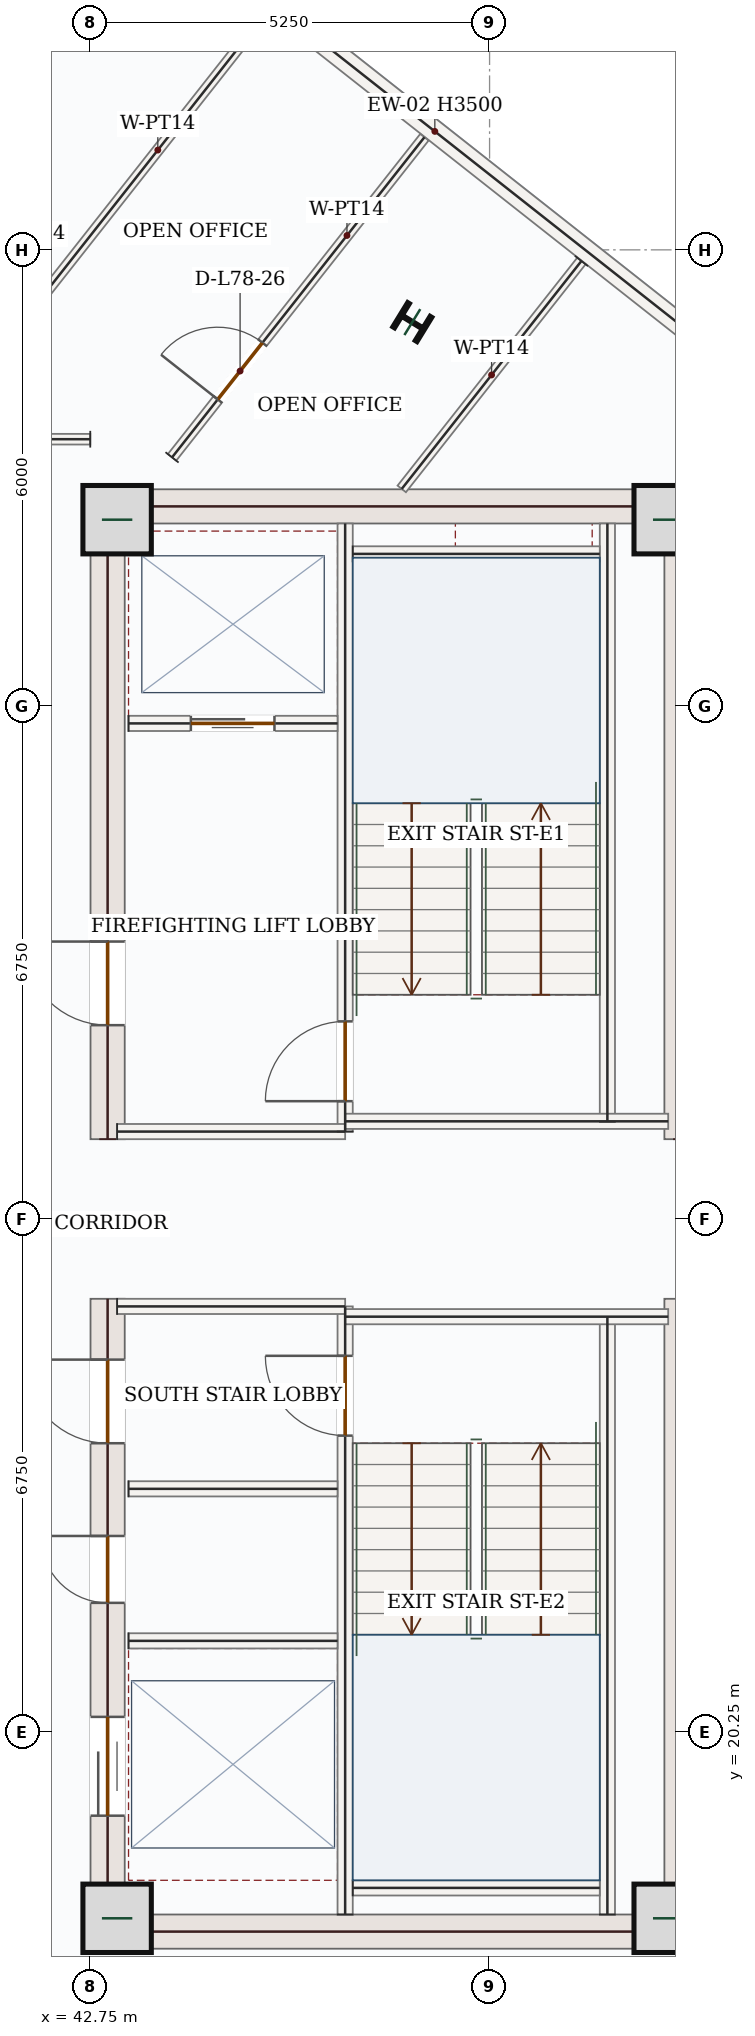
"""IFC4 building model, lengths in metres.
Left out: names, types, materials, properties, quantities, classifications, styles, units other than length and angle.
Written with IfcOpenShell. Run it as: python <this file> out.ifc"""

import sys

from ifc_helpers import new_model, si_unit, direction, frame, frame_2d, origin, origin_2d, place, context, subcontext, project, spatial, rectangle, i_section, extrude, source, transform, mapped, element, fill, save


model = new_model("IFC4")
c1 = context("Model", 3, precision=1e-05, world=origin(), true_north=direction((0.0, 1.0)))
c2 = subcontext(c1, "Body", "Model", "MODEL_VIEW")
j1 = project(units=[si_unit("LENGTHUNIT", "METRE"), si_unit("PLANEANGLEUNIT", "RADIAN")], contexts=[c1])
p1 = place(None, origin())
s1 = spatial("IfcSite", under=j1, at=p1, CompositionType="ELEMENT")
p2 = place(p1, origin())
s2 = spatial("IfcBuilding", under=s1, at=p2, CompositionType="ELEMENT")
p3 = place(p2, frame((0.0, 0.0, 323.55)))
s3 = spatial("IfcBuildingStorey", under=s2, at=p3, CompositionType="ELEMENT", Elevation=323.55)
p4 = place(p3, frame((42.975, 17.4, 0.0), z_axis=(0.0, 0.0, 1.0), x_axis=(0.0, 1.0, 0.0)))
e1 = element("IfcWall", 1, at=p4, inside=s3, PredefinedType="SHEAR", context=c2, shape_type="SweptSolid", body=[
    extrude(rectangle(XDim=8.55, YDim=0.45, at=frame_2d((4.275, 0.0))), origin(), (0.0, 0.0, 1.0), 3.5),
])
p5 = place(p4, frame((6.65, 0.0, 0.0)))
e2 = element("IfcOpeningElement", 2, at=p5, cuts=e1, PredefinedType="OPENING", context=c2, shape_type="SweptSolid", body=[
    extrude(rectangle(XDim=1.1, YDim=2.2, at=frame_2d((0.55, 1.1))), frame((0.0, 0.235, 0.0), z_axis=(0.0, -1.0, 0.0), x_axis=(1.0, 0.0, 0.0)), (0.0, 0.0, 1.0), 0.47),
])
p6 = place(p4, frame((1.75, 0.0, 0.0)))
e3 = element("IfcOpeningElement", 3, at=p6, cuts=e1, PredefinedType="OPENING", context=c2, shape_type="SweptSolid", body=[
    extrude(rectangle(XDim=1.3, YDim=2.2, at=frame_2d((0.65, 1.1))), frame((0.0, 0.235, 0.0), z_axis=(0.0, -1.0, 0.0), x_axis=(1.0, 0.0, 0.0)), (0.0, 0.0, 1.0), 0.47),
])
p7 = place(p4, frame((4.55, 0.0, 0.0)))
e4 = element("IfcOpeningElement", 4, at=p7, cuts=e1, PredefinedType="OPENING", context=c2, shape_type="SweptSolid", body=[
    extrude(rectangle(XDim=0.88, YDim=2.1, at=frame_2d((0.44, 1.05))), frame((0.0, 0.235, 0.0), z_axis=(0.0, -1.0, 0.0), x_axis=(1.0, 0.0, 0.0)), (0.0, 0.0, 1.0), 0.47),
])
p8 = place(p3, frame((42.975, 28.05, 0.0), z_axis=(0.0, 0.0, 1.0), x_axis=(0.0, 1.0, 0.0)))
e5 = element("IfcWall", 5, at=p8, inside=s3, PredefinedType="SHEAR", context=c2, shape_type="SweptSolid", body=[
    extrude(rectangle(XDim=8.55, YDim=0.45, at=frame_2d((4.275, 0.0))), origin(), (0.0, 0.0, 1.0), 3.5),
])
p9 = place(p8, frame((1.5, 0.0, 0.0)))
e6 = element("IfcOpeningElement", 6, at=p9, cuts=e5, PredefinedType="OPENING", context=c2, shape_type="SweptSolid", body=[
    extrude(rectangle(XDim=1.1, YDim=2.2, at=frame_2d((0.55, 1.1))), frame((0.0, 0.235, 0.0), z_axis=(0.0, -1.0, 0.0), x_axis=(1.0, 0.0, 0.0)), (0.0, 0.0, 1.0), 0.47),
])
m1 = source(origin(), c2, "Body", "SweptSolid", [
    extrude(rectangle(XDim=8.55, YDim=0.45, at=frame_2d((4.275, 0.0))), origin(), (0.0, 0.0, 1.0), 3.5),
])
for number, where, z_axis, x_axis in (
    (7, (50.525, 17.4, 0.0), (0.0, 0.0, 1.0), (0.0, 1.0, 0.0)),
    (8, (50.525, 28.05, 0.0), (0.0, 0.0, 1.0), (0.0, 1.0, 0.0)),
):
    element("IfcWall", number, at=place(p3, frame(where, z_axis=z_axis, x_axis=x_axis)), inside=s3, PredefinedType="SHEAR", context=c2, shape_type="MappedRepresentation", body=[
        mapped(m1, transform((0.0, 0.0, 0.0), x_axis=(1.0, 0.0, 0.0), y_axis=(0.0, 1.0, 0.0), z_axis=(0.0, 0.0, 1.0), scale=1.0)),
    ])
m2 = source(origin(), c2, "Body", "SweptSolid", [
    extrude(rectangle(XDim=7.1, YDim=0.45, at=frame_2d((3.55, 0.0))), origin(), (0.0, 0.0, 1.0), 3.5),
])
for number, where, z_axis, x_axis in (
    (9, (43.2, 17.625, 0.0), (0.0, 0.0, 1.0), (1.0, 0.0, 0.0)),
    (10, (43.2, 36.375, 0.0), (0.0, 0.0, 1.0), (1.0, 0.0, 0.0)),
):
    element("IfcWall", number, at=place(p3, frame(where, z_axis=z_axis, x_axis=x_axis)), inside=s3, PredefinedType="SHEAR", context=c2, shape_type="MappedRepresentation", body=[
        mapped(m2, transform((0.0, 0.0, 0.0), x_axis=(1.0, 0.0, 0.0), y_axis=(0.0, 1.0, 0.0), z_axis=(0.0, 0.0, 1.0), scale=1.0)),
    ])
m3 = source(origin(), c2, "Body", "SweptSolid", [
    extrude(rectangle(XDim=0.9, YDim=0.9, at=origin_2d()), origin(), (0.0, 0.0, 1.0), 3.75),
])
for number, where, z_axis, x_axis in (
    (11, (43.1, 17.8, 0.0), (0.0, 0.0, 1.0), (1.0, 0.0, 0.0)),
    (12, (50.35, 17.8, 0.0), (0.0, 0.0, 1.0), (1.0, 0.0, 0.0)),
    (13, (43.1, 36.2, 0.0), (0.0, 0.0, 1.0), (1.0, 0.0, 0.0)),
    (14, (50.35, 36.2, 0.0), (0.0, 0.0, 1.0), (1.0, 0.0, 0.0)),
):
    element("IfcColumn", number, at=place(p3, frame(where, z_axis=z_axis, x_axis=x_axis)), inside=s3, PredefinedType="COLUMN", context=c2, shape_type="MappedRepresentation", body=[
        mapped(m3, transform((0.0, 0.0, 0.0), x_axis=(1.0, 0.0, 0.0), y_axis=(0.0, 1.0, 0.0), z_axis=(0.0, 0.0, 1.0), scale=1.0)),
    ])
m4 = source(origin(), c2, "Body", "SweptSolid", [
    extrude(i_section(OverallWidth=0.374, OverallDepth=0.372, WebThickness=0.016, FlangeThickness=0.026, FilletRadius=0.018, at=origin_2d()), origin(), (0.0, 0.0, 1.0), 3.75),
])
p10 = place(p3, frame((46.984, 38.8, 0.0), z_axis=(0.0, 0.0, 1.0), x_axis=(0.522498564716, 0.852640164354, 0.0)))
e15 = element("IfcColumn", 15, at=p10, inside=s3, PredefinedType="COLUMN", context=c2, shape_type="MappedRepresentation", body=[
    mapped(m4, transform((0.0, 0.0, 0.0), x_axis=(1.0, 0.0, 0.0), y_axis=(0.0, 1.0, 0.0), z_axis=(0.0, 0.0, 1.0), scale=1.0)),
])
m5 = source(origin(), c2, "Body", "SweptSolid", [
    extrude(rectangle(XDim=9.92, YDim=0.28, at=frame_2d((4.96, 0.0))), origin(), (0.0, 0.0, 1.0), 3.5),
])
p11 = place(p3, frame((43.385, 44.379, 0.0), z_axis=(0.0, 0.0, 1.0), x_axis=(0.785317257435, -0.619093535077, 0.0)))
e16 = element("IfcWall", 16, at=p11, inside=s3, PredefinedType="SOLIDWALL", context=c2, shape_type="MappedRepresentation", body=[
    mapped(m5, transform((0.0, 0.0, 0.0), x_axis=(1.0, 0.0, 0.0), y_axis=(0.0, 1.0, 0.0), z_axis=(0.0, 0.0, 1.0), scale=1.0)),
])
p12 = place(p3, frame((53.06, 18.458, 0.0), z_axis=(0.0, 0.0, 1.0), x_axis=(-0.707106781187, -0.707106781187, 0.0)))
e17 = element("IfcWall", 17, at=p12, inside=s3, PredefinedType="SOLIDWALL", context=c2, shape_type="SweptSolid", body=[
    extrude(rectangle(XDim=3.963, YDim=0.28, at=frame_2d((1.982, 0.0))), origin(), (0.0, 0.0, 1.0), 3.5),
])
p13 = place(p12, frame((1.232, 0.0, 0.85)))
e18 = element("IfcOpeningElement", 18, at=p13, cuts=e17, PredefinedType="OPENING", context=c2, shape_type="SweptSolid", body=[
    extrude(rectangle(XDim=1.5, YDim=1.5, at=frame_2d((0.75, 0.75))), frame((0.0, 0.15, 0.0), z_axis=(0.0, -1.0, 0.0), x_axis=(1.0, 0.0, 0.0)), (0.0, 0.0, 1.0), 0.3),
])
m6 = source(origin(), c2, "Body", "SweptSolid", [
    extrude(rectangle(XDim=7.87, YDim=0.2, at=frame_2d((3.935, 0.0))), origin(), (0.0, 0.0, 1.0), 3.5),
])
for number, where, z_axis, x_axis in (
    (19, (49.55, 17.85, 0.0), (0.0, 0.0, 1.0), (0.0, 1.0, 0.0)),
    (20, (49.55, 28.28, 0.0), (0.0, 0.0, 1.0), (0.0, 1.0, 0.0)),
):
    element("IfcWall", number, at=place(p3, frame(where, z_axis=z_axis, x_axis=x_axis)), inside=s3, PredefinedType="SOLIDWALL", context=c2, shape_type="MappedRepresentation", body=[
        mapped(m6, transform((0.0, 0.0, 0.0), x_axis=(1.0, 0.0, 0.0), y_axis=(0.0, 1.0, 0.0), z_axis=(0.0, 0.0, 1.0), scale=1.0)),
    ])
p14 = place(p3, frame((46.1, 17.85, 0.0), z_axis=(0.0, 0.0, 1.0), x_axis=(0.0, 1.0, 0.0)))
e21 = element("IfcWall", 21, at=p14, inside=s3, PredefinedType="SOLIDWALL", context=c2, shape_type="SweptSolid", body=[
    extrude(rectangle(XDim=8.0, YDim=0.2, at=frame_2d((4.0, 0.0))), origin(), (0.0, 0.0, 1.0), 3.5),
])
p15 = place(p14, frame((6.3, 0.0, 0.0)))
e22 = element("IfcOpeningElement", 22, at=p15, cuts=e21, PredefinedType="OPENING", context=c2, shape_type="SweptSolid", body=[
    extrude(rectangle(XDim=1.05, YDim=2.15, at=frame_2d((0.525, 1.075))), frame((0.0, 0.11, 0.0), z_axis=(0.0, -1.0, 0.0), x_axis=(1.0, 0.0, 0.0)), (0.0, 0.0, 1.0), 0.22),
])
p16 = place(p3, frame((46.1, 28.15, 0.0), z_axis=(0.0, 0.0, 1.0), x_axis=(0.0, 1.0, 0.0)))
e23 = element("IfcWall", 23, at=p16, inside=s3, PredefinedType="SOLIDWALL", context=c2, shape_type="SweptSolid", body=[
    extrude(rectangle(XDim=8.0, YDim=0.2, at=frame_2d((4.0, 0.0))), origin(), (0.0, 0.0, 1.0), 3.5),
])
p17 = place(p16, frame((0.4, 0.0, 0.0)))
e24 = element("IfcOpeningElement", 24, at=p17, cuts=e23, PredefinedType="OPENING", context=c2, shape_type="SweptSolid", body=[
    extrude(rectangle(XDim=1.05, YDim=2.15, at=frame_2d((0.525, 1.075))), frame((0.0, 0.11, 0.0), z_axis=(0.0, -1.0, 0.0), x_axis=(1.0, 0.0, 0.0)), (0.0, 0.0, 1.0), 0.22),
])
m7 = source(origin(), c2, "Body", "SweptSolid", [
    extrude(rectangle(XDim=3.0, YDim=0.2, at=frame_2d((1.5, 0.0))), origin(), (0.0, 0.0, 1.0), 3.5),
])
p18 = place(p3, frame((43.1, 25.85, 0.0), z_axis=(0.0, 0.0, 1.0), x_axis=(1.0, 0.0, 0.0)))
e25 = element("IfcWall", 25, at=p18, inside=s3, PredefinedType="SOLIDWALL", context=c2, shape_type="MappedRepresentation", body=[
    mapped(m7, transform((0.0, 0.0, 0.0), x_axis=(1.0, 0.0, 0.0), y_axis=(0.0, 1.0, 0.0), z_axis=(0.0, 0.0, 1.0), scale=1.0)),
])
m8 = source(origin(), c2, "Body", "SweptSolid", [
    extrude(rectangle(XDim=4.25, YDim=0.2, at=frame_2d((2.125, 0.0))), origin(), (0.0, 0.0, 1.0), 3.5),
])
p19 = place(p3, frame((46.1, 25.715, 0.0), z_axis=(0.0, 0.0, 1.0), x_axis=(1.0, 0.0, 0.0)))
e26 = element("IfcWall", 26, at=p19, inside=s3, PredefinedType="SOLIDWALL", context=c2, shape_type="MappedRepresentation", body=[
    mapped(m8, transform((0.0, 0.0, 0.0), x_axis=(1.0, 0.0, 0.0), y_axis=(0.0, 1.0, 0.0), z_axis=(0.0, 0.0, 1.0), scale=1.0)),
])
p20 = place(p3, frame((43.1, 28.15, 0.0), z_axis=(0.0, 0.0, 1.0), x_axis=(1.0, 0.0, 0.0)))
e27 = element("IfcWall", 27, at=p20, inside=s3, PredefinedType="SOLIDWALL", context=c2, shape_type="MappedRepresentation", body=[
    mapped(m7, transform((0.0, 0.0, 0.0), x_axis=(1.0, 0.0, 0.0), y_axis=(0.0, 1.0, 0.0), z_axis=(0.0, 0.0, 1.0), scale=1.0)),
])
p21 = place(p3, frame((46.1, 28.285, 0.0), z_axis=(0.0, 0.0, 1.0), x_axis=(1.0, 0.0, 0.0)))
e28 = element("IfcWall", 28, at=p21, inside=s3, PredefinedType="SOLIDWALL", context=c2, shape_type="MappedRepresentation", body=[
    mapped(m8, transform((0.0, 0.0, 0.0), x_axis=(1.0, 0.0, 0.0), y_axis=(0.0, 1.0, 0.0), z_axis=(0.0, 0.0, 1.0), scale=1.0)),
])
m9 = source(origin(), c2, "Body", "SweptSolid", [
    extrude(rectangle(XDim=3.25, YDim=0.2, at=frame_2d((1.625, 0.0))), origin(), (0.0, 0.0, 1.0), 3.5),
])
for number, where, z_axis, x_axis in (
    (29, (46.2, 35.75, 0.0), (0.0, 0.0, 1.0), (1.0, 0.0, 0.0)),
    (30, (46.2, 18.2, 0.0), (0.0, 0.0, 1.0), (1.0, 0.0, 0.0)),
):
    element("IfcWall", number, at=place(p3, frame(where, z_axis=z_axis, x_axis=x_axis)), inside=s3, PredefinedType="SOLIDWALL", context=c2, shape_type="MappedRepresentation", body=[
        mapped(m9, transform((0.0, 0.0, 0.0), x_axis=(1.0, 0.0, 0.0), y_axis=(0.0, 1.0, 0.0), z_axis=(0.0, 0.0, 1.0), scale=1.0)),
    ])
p22 = place(p3, frame((43.25, 33.52, 0.0), z_axis=(0.0, 0.0, 1.0), x_axis=(1.0, 0.0, 0.0)))
e31 = element("IfcWall", 31, at=p22, inside=s3, PredefinedType="SOLIDWALL", context=c2, shape_type="SweptSolid", body=[
    extrude(rectangle(XDim=2.75, YDim=0.2, at=frame_2d((1.375, 0.0))), origin(), (0.0, 0.0, 1.0), 3.5),
])
p23 = place(p22, frame((0.82, 0.0, 0.0)))
e32 = element("IfcOpeningElement", 32, at=p23, cuts=e31, PredefinedType="OPENING", context=c2, shape_type="SweptSolid", body=[
    extrude(rectangle(XDim=1.1, YDim=2.15, at=frame_2d((0.55, 1.075))), frame((0.0, 0.11, 0.0), z_axis=(0.0, -1.0, 0.0), x_axis=(1.0, 0.0, 0.0)), (0.0, 0.0, 1.0), 0.22),
])
m10 = source(origin(), c2, "Body", "SweptSolid", [
    extrude(rectangle(XDim=2.75, YDim=0.2, at=frame_2d((1.375, 0.0))), origin(), (0.0, 0.0, 1.0), 3.5),
])
for number, where, z_axis, x_axis in (
    (33, (43.25, 23.45, 0.0), (0.0, 0.0, 1.0), (1.0, 0.0, 0.0)),
    (34, (43.25, 21.45, 0.0), (0.0, 0.0, 1.0), (1.0, 0.0, 0.0)),
):
    element("IfcWall", number, at=place(p3, frame(where, z_axis=z_axis, x_axis=x_axis)), inside=s3, PredefinedType="SOLIDWALL", context=c2, shape_type="MappedRepresentation", body=[
        mapped(m10, transform((0.0, 0.0, 0.0), x_axis=(1.0, 0.0, 0.0), y_axis=(0.0, 1.0, 0.0), z_axis=(0.0, 0.0, 1.0), scale=1.0)),
    ])
m11 = source(origin(), c2, "Body", "SweptSolid", [
    extrude(rectangle(XDim=3.818, YDim=0.14, at=frame_2d((1.909, 0.0))), origin(), (0.0, 0.0, 1.0), 3.5),
])
p24 = place(p3, frame((49.208, 39.604, 0.0), z_axis=(0.0, 0.0, 1.0), x_axis=(-0.619119655452, -0.78529666511, 0.0)))
e35 = element("IfcWall", 35, at=p24, inside=s3, PredefinedType="PARTITIONING", context=c2, shape_type="MappedRepresentation", body=[
    mapped(m11, transform((0.0, 0.0, 0.0), x_axis=(1.0, 0.0, 0.0), y_axis=(0.0, 1.0, 0.0), z_axis=(0.0, 0.0, 1.0), scale=1.0)),
])
p25 = place(p3, frame((43.823, 37.02, 0.0), z_axis=(0.0, 0.0, 1.0), x_axis=(0.619105408422, 0.785307897109, 0.0)))
e36 = element("IfcWall", 36, at=p25, inside=s3, PredefinedType="PARTITIONING", context=c2, shape_type="SweptSolid", body=[
    extrude(rectangle(XDim=5.363, YDim=0.14, at=frame_2d((2.682, 0.0))), origin(), (0.0, 0.0, 1.0), 3.5),
])
p26 = place(p25, frame((0.971, 0.0, 0.0)))
e37 = element("IfcOpeningElement", 37, at=p26, cuts=e36, PredefinedType="OPENING", context=c2, shape_type="SweptSolid", body=[
    extrude(rectangle(XDim=0.95, YDim=2.15, at=frame_2d((0.475, 1.075))), frame((0.0, 0.08, 0.0), z_axis=(0.0, -1.0, 0.0), x_axis=(1.0, 0.0, 0.0)), (0.0, 0.0, 1.0), 0.16),
])
m12 = source(origin(), c2, "Body", "SweptSolid", [
    extrude(rectangle(XDim=2.109, YDim=0.14, at=frame_2d((1.054, 0.0))), origin(), (0.0, 0.0, 1.0), 3.5),
])
p27 = place(p3, frame((42.747, 37.259, 0.0), z_axis=(0.0, 0.0, 1.0), x_axis=(-0.999999832474, 0.000578837597, 0.0)))
e38 = element("IfcWall", 38, at=p27, inside=s3, PredefinedType="PARTITIONING", context=c2, shape_type="MappedRepresentation", body=[
    mapped(m12, transform((0.0, 0.0, 0.0), x_axis=(1.0, 0.0, 0.0), y_axis=(0.0, 1.0, 0.0), z_axis=(0.0, 0.0, 1.0), scale=1.0)),
])
p28 = place(p3, frame((40.697, 37.335, 0.0), z_axis=(0.0, 0.0, 1.0), x_axis=(0.619105259882, 0.785308014213, 0.0)))
e39 = element("IfcWall", 39, at=p28, inside=s3, PredefinedType="PARTITIONING", context=c2, shape_type="SweptSolid", body=[
    extrude(rectangle(XDim=7.051, YDim=0.14, at=frame_2d((3.525, 0.0))), origin(), (0.0, 0.0, 1.0), 3.5),
])
p29 = place(p28, frame((1.342, 0.0, 0.0)))
e40 = element("IfcOpeningElement", 40, at=p29, cuts=e39, PredefinedType="OPENING", context=c2, shape_type="SweptSolid", body=[
    extrude(rectangle(XDim=0.95, YDim=2.15, at=frame_2d((0.475, 1.075))), frame((0.0, 0.08, 0.0), z_axis=(0.0, -1.0, 0.0), x_axis=(1.0, 0.0, 0.0)), (0.0, 0.0, 1.0), 0.16),
])
m13 = source(origin(), c2, "Body", "SweptSolid", [
    extrude(rectangle(XDim=1.05, YDim=2.15, at=frame_2d((0.525, 1.075))), frame((0.0, 0.025, 0.0), z_axis=(0.0, -1.0, 0.0), x_axis=(1.0, 0.0, 0.0)), (0.0, 0.0, 1.0), 0.05),
])
p30 = place(p17, origin())
e41 = element("IfcDoor", 41, at=p30, inside=s3, OperationType="SINGLE_SWING_LEFT", PredefinedType="DOOR", context=c2, shape_type="MappedRepresentation", body=[
    mapped(m13, transform((0.0, 0.0, 0.0), x_axis=(1.0, 0.0, 0.0), y_axis=(0.0, 1.0, 0.0), z_axis=(0.0, 0.0, 1.0), scale=1.0)),
])
fill(e24, e41)
p31 = place(p15, origin())
e42 = element("IfcDoor", 42, at=p31, inside=s3, OperationType="SINGLE_SWING_RIGHT", PredefinedType="DOOR", context=c2, shape_type="MappedRepresentation", body=[
    mapped(m13, transform((0.0, 0.0, 0.0), x_axis=(1.0, 0.0, 0.0), y_axis=(0.0, 1.0, 0.0), z_axis=(0.0, 0.0, 1.0), scale=1.0)),
])
fill(e22, e42)
m14 = source(origin(), c2, "Body", "SweptSolid", [
    extrude(rectangle(XDim=1.1, YDim=2.15, at=frame_2d((0.55, 1.075))), frame((0.0, 0.025, 0.0), z_axis=(0.0, -1.0, 0.0), x_axis=(1.0, 0.0, 0.0)), (0.0, 0.0, 1.0), 0.05),
])
p32 = place(p23, origin())
e43 = element("IfcDoor", 43, at=p32, inside=s3, OperationType="DOUBLE_DOOR_SLIDING", PredefinedType="DOOR", context=c2, shape_type="MappedRepresentation", body=[
    mapped(m14, transform((0.0, 0.0, 0.0), x_axis=(1.0, 0.0, 0.0), y_axis=(0.0, 1.0, 0.0), z_axis=(0.0, 0.0, 1.0), scale=1.0)),
])
fill(e32, e43)
m15 = source(origin(), c2, "Body", "SweptSolid", [
    extrude(rectangle(XDim=1.1, YDim=2.2, at=frame_2d((0.55, 1.1))), frame((0.0, 0.025, 0.0), z_axis=(0.0, -1.0, 0.0), x_axis=(1.0, 0.0, 0.0)), (0.0, 0.0, 1.0), 0.05),
])
p33 = place(p9, origin())
e44 = element("IfcDoor", 44, at=p33, inside=s3, OperationType="SINGLE_SWING_RIGHT", PredefinedType="DOOR", context=c2, shape_type="MappedRepresentation", body=[
    mapped(m15, transform((0.0, 0.0, 0.0), x_axis=(1.0, 0.0, 0.0), y_axis=(0.0, 1.0, 0.0), z_axis=(0.0, 0.0, 1.0), scale=1.0)),
])
fill(e6, e44)
p34 = place(p5, origin())
e45 = element("IfcDoor", 45, at=p34, inside=s3, OperationType="SINGLE_SWING_RIGHT", PredefinedType="DOOR", context=c2, shape_type="MappedRepresentation", body=[
    mapped(m15, transform((0.0, 0.0, 0.0), x_axis=(1.0, 0.0, 0.0), y_axis=(0.0, 1.0, 0.0), z_axis=(0.0, 0.0, 1.0), scale=1.0)),
])
fill(e2, e45)
m16 = source(origin(), c2, "Body", "SweptSolid", [
    extrude(rectangle(XDim=1.3, YDim=2.2, at=frame_2d((0.65, 1.1))), frame((0.0, 0.025, 0.0), z_axis=(0.0, -1.0, 0.0), x_axis=(1.0, 0.0, 0.0)), (0.0, 0.0, 1.0), 0.05),
])
p35 = place(p6, origin())
e46 = element("IfcDoor", 46, at=p35, inside=s3, OperationType="DOUBLE_DOOR_SLIDING", PredefinedType="DOOR", context=c2, shape_type="MappedRepresentation", body=[
    mapped(m16, transform((0.0, 0.0, 0.0), x_axis=(1.0, 0.0, 0.0), y_axis=(0.0, 1.0, 0.0), z_axis=(0.0, 0.0, 1.0), scale=1.0)),
])
fill(e3, e46)
m17 = source(origin(), c2, "Body", "SweptSolid", [
    extrude(rectangle(XDim=0.88, YDim=2.1, at=frame_2d((0.44, 1.05))), frame((0.0, 0.025, 0.0), z_axis=(0.0, -1.0, 0.0), x_axis=(1.0, 0.0, 0.0)), (0.0, 0.0, 1.0), 0.05),
])
p36 = place(p7, origin())
e47 = element("IfcDoor", 47, at=p36, inside=s3, OperationType="SINGLE_SWING_RIGHT", PredefinedType="DOOR", context=c2, shape_type="MappedRepresentation", body=[
    mapped(m17, transform((0.0, 0.0, 0.0), x_axis=(1.0, 0.0, 0.0), y_axis=(0.0, 1.0, 0.0), z_axis=(0.0, 0.0, 1.0), scale=1.0)),
])
fill(e4, e47)
m18 = source(origin(), c2, "Body", "SweptSolid", [
    extrude(rectangle(XDim=0.95, YDim=2.15, at=frame_2d((0.475, 1.075))), frame((0.0, 0.025, 0.0), z_axis=(0.0, -1.0, 0.0), x_axis=(1.0, 0.0, 0.0)), (0.0, 0.0, 1.0), 0.05),
])
p37 = place(p26, origin())
e48 = element("IfcDoor", 48, at=p37, inside=s3, OperationType="SINGLE_SWING_LEFT", PredefinedType="DOOR", context=c2, shape_type="MappedRepresentation", body=[
    mapped(m18, transform((0.0, 0.0, 0.0), x_axis=(1.0, 0.0, 0.0), y_axis=(0.0, 1.0, 0.0), z_axis=(0.0, 0.0, 1.0), scale=1.0)),
])
fill(e37, e48)
save(model, sys.argv[1])
